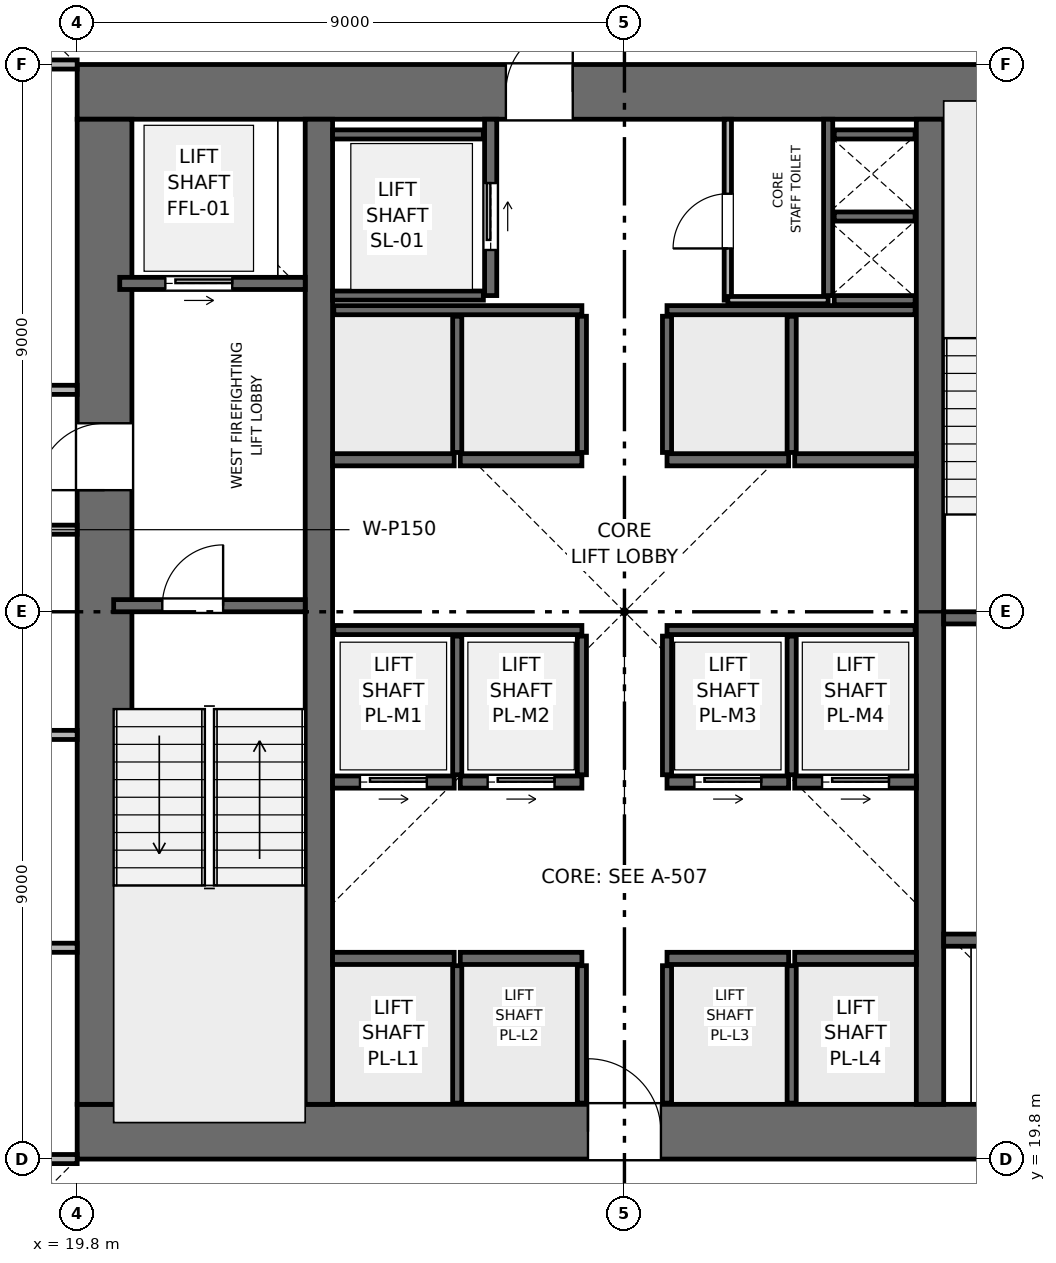
"""IFC4 building model, lengths in metres.
Left out: names, types, materials, properties, quantities, classifications, styles, units other than length and angle.
Written with IfcOpenShell. Run it as: python <this file> out.ifc"""

import sys

from ifc_helpers import new_model, si_unit, direction, frame, frame_2d, origin, place, context, subcontext, project, spatial, rectangle, extrude, element, fill, save


model = new_model("IFC4")
c1 = context("Model", 3, precision=1e-05, world=origin(), true_north=direction((0.0, 1.0)))
c2 = subcontext(c1, "Body", "Model", "MODEL_VIEW")
j1 = project(units=[si_unit("LENGTHUNIT", "METRE"), si_unit("PLANEANGLEUNIT", "RADIAN")], contexts=[c1])
p1 = place(None, origin())
s1 = spatial("IfcSite", under=j1, at=p1, CompositionType="ELEMENT")
p2 = place(p1, origin())
s2 = spatial("IfcBuilding", under=s1, at=p2, CompositionType="ELEMENT")
p3 = place(p2, frame((0.0, 0.0, 138.3)))
s3 = spatial("IfcBuildingStorey", under=s2, at=p3, CompositionType="ELEMENT", Elevation=138.3)
p4 = place(p3, frame((19.8, 20.25, 0.0), z_axis=(0.0, 0.0, 1.0), x_axis=(1.0, 0.0, 0.0)))
e1 = element("IfcWall", 1, at=p4, inside=s3, PredefinedType="SHEAR", context=c2, shape_type="SweptSolid", body=[
    extrude(rectangle(XDim=18.0, YDim=0.9, at=frame_2d((9.0, 0.0))), origin(), (0.0, 0.0, 1.0), 3.75),
])
p5 = place(p4, frame((8.4, 0.0, 0.0)))
e2 = element("IfcOpeningElement", 2, at=p5, cuts=e1, PredefinedType="OPENING", context=c2, shape_type="SweptSolid", body=[
    extrude(rectangle(XDim=1.2, YDim=2.2, at=frame_2d((0.6, 1.1))), frame((0.0, 0.46, 0.0), z_axis=(0.0, -1.0, 0.0), x_axis=(1.0, 0.0, 0.0)), (0.0, 0.0, 1.0), 0.92),
])
p6 = place(p3, frame((19.8, 37.35, 0.0), z_axis=(0.0, 0.0, 1.0), x_axis=(1.0, 0.0, 0.0)))
e3 = element("IfcWall", 3, at=p6, inside=s3, PredefinedType="SHEAR", context=c2, shape_type="SweptSolid", body=[
    extrude(rectangle(XDim=18.0, YDim=0.9, at=frame_2d((9.0, 0.0))), origin(), (0.0, 0.0, 1.0), 3.75),
])
p7 = place(p6, frame((7.05, 0.0, 0.0)))
e4 = element("IfcOpeningElement", 4, at=p7, cuts=e3, PredefinedType="OPENING", context=c2, shape_type="SweptSolid", body=[
    extrude(rectangle(XDim=1.1, YDim=2.15, at=frame_2d((0.55, 1.075))), frame((0.0, 0.46, 0.0), z_axis=(0.0, -1.0, 0.0), x_axis=(1.0, 0.0, 0.0)), (0.0, 0.0, 1.0), 0.92),
])
p8 = place(p3, frame((20.25, 20.7, 0.0), z_axis=(0.0, 0.0, 1.0), x_axis=(0.0, 1.0, 0.0)))
e5 = element("IfcWall", 5, at=p8, inside=s3, PredefinedType="SHEAR", context=c2, shape_type="SweptSolid", body=[
    extrude(rectangle(XDim=16.2, YDim=0.9, at=frame_2d((8.1, 0.0))), origin(), (0.0, 0.0, 1.0), 3.75),
])
p9 = place(p8, frame((10.1, 0.0, 0.0)))
e6 = element("IfcOpeningElement", 6, at=p9, cuts=e5, PredefinedType="OPENING", context=c2, shape_type="SweptSolid", body=[
    extrude(rectangle(XDim=1.1, YDim=2.15, at=frame_2d((0.55, 1.075))), frame((0.0, 0.46, 0.0), z_axis=(0.0, -1.0, 0.0), x_axis=(1.0, 0.0, 0.0)), (0.0, 0.0, 1.0), 0.92),
])
for number, where, z_axis, x_axis in (
    (7, (23.775, 20.7, 0.0), (0.0, 0.0, 1.0), (0.0, 1.0, 0.0)),
    (8, (33.825, 20.7, 0.0), (0.0, 0.0, 1.0), (0.0, 1.0, 0.0)),
):
    element("IfcWall", number, at=place(p3, frame(where, z_axis=z_axis, x_axis=x_axis)), inside=s3, PredefinedType="SHEAR", context=c2, shape_type="SweptSolid", body=[
        extrude(rectangle(XDim=16.2, YDim=0.45, at=frame_2d((8.1, 0.0))), origin(), (0.0, 0.0, 1.0), 3.75),
    ])
p10 = place(p3, frame((20.4, 28.9, 0.0), z_axis=(0.0, 0.0, 1.0), x_axis=(1.0, 0.0, 0.0)))
e9 = element("IfcWall", 9, at=p10, inside=s3, PredefinedType="SHEAR", context=c2, shape_type="SweptSolid", body=[
    extrude(rectangle(XDim=3.15, YDim=0.2, at=frame_2d((1.575, 0.0))), origin(), (0.0, 0.0, 1.0), 3.495),
])
p11 = place(p10, frame((0.8, 0.0, 0.0)))
e10 = element("IfcOpeningElement", 10, at=p11, cuts=e9, PredefinedType="OPENING", context=c2, shape_type="SweptSolid", body=[
    extrude(rectangle(XDim=1.0, YDim=2.1, at=frame_2d((0.5, 1.05))), frame((0.0, 0.11, 0.0), z_axis=(0.0, -1.0, 0.0), x_axis=(1.0, 0.0, 0.0)), (0.0, 0.0, 1.0), 0.22),
])
p12 = place(p3, frame((34.05, 28.7, 0.0), z_axis=(0.0, 0.0, 1.0), x_axis=(1.0, 0.0, 0.0)))
e11 = element("IfcWall", 11, at=p12, inside=s3, PredefinedType="SHEAR", context=c2, shape_type="SweptSolid", body=[
    extrude(rectangle(XDim=3.15, YDim=0.2, at=frame_2d((1.575, 0.0))), origin(), (0.0, 0.0, 1.0), 3.495),
])
p13 = place(p12, frame((0.8, 0.0, 0.0)))
e12 = element("IfcOpeningElement", 12, at=p13, cuts=e11, PredefinedType="OPENING", context=c2, shape_type="SweptSolid", body=[
    extrude(rectangle(XDim=1.0, YDim=2.1, at=frame_2d((0.5, 1.05))), frame((0.0, 0.11, 0.0), z_axis=(0.0, -1.0, 0.0), x_axis=(1.0, 0.0, 0.0)), (0.0, 0.0, 1.0), 0.22),
])
p14 = place(p3, frame((32.15, 34.0, 0.0), z_axis=(0.0, 0.0, 1.0), x_axis=(0.0, 1.0, 0.0)))
e13 = element("IfcWall", 13, at=p14, inside=s3, PredefinedType="SHEAR", context=c2, shape_type="SweptSolid", body=[
    extrude(rectangle(XDim=2.9, YDim=0.15, at=frame_2d((1.45, 0.0))), origin(), (0.0, 0.0, 1.0), 3.495),
])
for number, where, z_axis, x_axis in (
    (14, (32.25, 33.925, 0.0), (0.0, 0.0, 1.0), (1.0, 0.0, 0.0)),
    (15, (32.25, 35.3, 0.0), (0.0, 0.0, 1.0), (1.0, 0.0, 0.0)),
):
    element("IfcWall", number, at=place(p3, frame(where, z_axis=z_axis, x_axis=x_axis)), inside=s3, PredefinedType="SHEAR", context=c2, shape_type="SweptSolid", body=[
        extrude(rectangle(XDim=1.33, YDim=0.15, at=frame_2d((0.665, 0.0))), origin(), (0.0, 0.0, 1.0), 3.495),
    ])
p15 = place(p3, frame((20.5, 34.2, 0.0), z_axis=(0.0, 0.0, 1.0), x_axis=(1.0, 0.0, 0.0)))
e16 = element("IfcWall", 16, at=p15, inside=s3, PredefinedType="SHEAR", context=c2, shape_type="SweptSolid", body=[
    extrude(rectangle(XDim=3.05, YDim=0.2, at=frame_2d((1.525, 0.0))), origin(), (0.0, 0.0, 1.0), 3.495),
])
p16 = place(p15, frame((0.75, 0.0, 0.0)))
e17 = element("IfcOpeningElement", 17, at=p16, cuts=e16, PredefinedType="OPENING", context=c2, shape_type="SweptSolid", body=[
    extrude(rectangle(XDim=1.1, YDim=2.15, at=frame_2d((0.55, 1.075))), frame((0.0, 0.11, 0.0), z_axis=(0.0, -1.0, 0.0), x_axis=(1.0, 0.0, 0.0)), (0.0, 0.0, 1.0), 0.22),
])
p17 = place(p3, frame((34.05, 23.4, 0.0), z_axis=(0.0, 0.0, 1.0), x_axis=(1.0, 0.0, 0.0)))
e18 = element("IfcWall", 18, at=p17, inside=s3, PredefinedType="SHEAR", context=c2, shape_type="SweptSolid", body=[
    extrude(rectangle(XDim=3.05, YDim=0.2, at=frame_2d((1.525, 0.0))), origin(), (0.0, 0.0, 1.0), 3.495),
])
p18 = place(p17, frame((1.2, 0.0, 0.0)))
e19 = element("IfcOpeningElement", 19, at=p18, cuts=e18, PredefinedType="OPENING", context=c2, shape_type="SweptSolid", body=[
    extrude(rectangle(XDim=1.1, YDim=2.15, at=frame_2d((0.55, 1.075))), frame((0.0, 0.11, 0.0), z_axis=(0.0, -1.0, 0.0), x_axis=(1.0, 0.0, 0.0)), (0.0, 0.0, 1.0), 0.22),
])
p19 = place(p3, frame((26.6, 34.0, 0.0), z_axis=(0.0, 0.0, 1.0), x_axis=(0.0, 1.0, 0.0)))
e20 = element("IfcWall", 20, at=p19, inside=s3, PredefinedType="SHEAR", context=c2, shape_type="SweptSolid", body=[
    extrude(rectangle(XDim=2.9, YDim=0.2, at=frame_2d((1.45, 0.0))), origin(), (0.0, 0.0, 1.0), 3.495),
])
p20 = place(p19, frame((0.75, 0.0, 0.0)))
e21 = element("IfcOpeningElement", 21, at=p20, cuts=e20, PredefinedType="OPENING", context=c2, shape_type="SweptSolid", body=[
    extrude(rectangle(XDim=1.1, YDim=2.15, at=frame_2d((0.55, 1.075))), frame((0.0, 0.11, 0.0), z_axis=(0.0, -1.0, 0.0), x_axis=(1.0, 0.0, 0.0)), (0.0, 0.0, 1.0), 0.22),
])
for number, where, z_axis, x_axis in (
    (22, (24.0, 34.0, 0.0), (0.0, 0.0, 1.0), (1.0, 0.0, 0.0)),
    (23, (24.0, 36.65, 0.0), (0.0, 0.0, 1.0), (1.0, 0.0, 0.0)),
):
    element("IfcWall", number, at=place(p3, frame(where, z_axis=z_axis, x_axis=x_axis)), inside=s3, PredefinedType="SHEAR", context=c2, shape_type="SweptSolid", body=[
        extrude(rectangle(XDim=2.48, YDim=0.15, at=frame_2d((1.24, 0.0))), origin(), (0.0, 0.0, 1.0), 3.495),
    ])
for number, where, z_axis, x_axis in (
    (24, (24.0, 23.1, 0.0), (0.0, 0.0, 1.0), (1.0, 0.0, 0.0)),
    (25, (26.1, 23.1, 0.0), (0.0, 0.0, 1.0), (1.0, 0.0, 0.0)),
    (26, (29.5, 23.1, 0.0), (0.0, 0.0, 1.0), (1.0, 0.0, 0.0)),
    (27, (31.6, 23.1, 0.0), (0.0, 0.0, 1.0), (1.0, 0.0, 0.0)),
):
    element("IfcWall", number, at=place(p3, frame(where, z_axis=z_axis, x_axis=x_axis)), inside=s3, PredefinedType="SHEAR", context=c2, shape_type="SweptSolid", body=[
        extrude(rectangle(XDim=2.0, YDim=0.2, at=frame_2d((1.0, 0.0))), origin(), (0.0, 0.0, 1.0), 3.495),
    ])
p21 = place(p3, frame((24.0, 26.0, 0.0), z_axis=(0.0, 0.0, 1.0), x_axis=(1.0, 0.0, 0.0)))
e28 = element("IfcWall", 28, at=p21, inside=s3, PredefinedType="SHEAR", context=c2, shape_type="SweptSolid", body=[
    extrude(rectangle(XDim=2.0, YDim=0.2, at=frame_2d((1.0, 0.0))), origin(), (0.0, 0.0, 1.0), 3.495),
])
p22 = place(p21, frame((0.45, 0.0, 0.0)))
e29 = element("IfcOpeningElement", 29, at=p22, cuts=e28, PredefinedType="OPENING", context=c2, shape_type="SweptSolid", body=[
    extrude(rectangle(XDim=1.1, YDim=2.15, at=frame_2d((0.55, 1.075))), frame((0.0, 0.11, 0.0), z_axis=(0.0, -1.0, 0.0), x_axis=(1.0, 0.0, 0.0)), (0.0, 0.0, 1.0), 0.22),
])
p23 = place(p3, frame((26.1, 26.0, 0.0), z_axis=(0.0, 0.0, 1.0), x_axis=(1.0, 0.0, 0.0)))
e30 = element("IfcWall", 30, at=p23, inside=s3, PredefinedType="SHEAR", context=c2, shape_type="SweptSolid", body=[
    extrude(rectangle(XDim=2.0, YDim=0.2, at=frame_2d((1.0, 0.0))), origin(), (0.0, 0.0, 1.0), 3.495),
])
p24 = place(p23, frame((0.45, 0.0, 0.0)))
e31 = element("IfcOpeningElement", 31, at=p24, cuts=e30, PredefinedType="OPENING", context=c2, shape_type="SweptSolid", body=[
    extrude(rectangle(XDim=1.1, YDim=2.15, at=frame_2d((0.55, 1.075))), frame((0.0, 0.11, 0.0), z_axis=(0.0, -1.0, 0.0), x_axis=(1.0, 0.0, 0.0)), (0.0, 0.0, 1.0), 0.22),
])
p25 = place(p3, frame((29.5, 26.0, 0.0), z_axis=(0.0, 0.0, 1.0), x_axis=(1.0, 0.0, 0.0)))
e32 = element("IfcWall", 32, at=p25, inside=s3, PredefinedType="SHEAR", context=c2, shape_type="SweptSolid", body=[
    extrude(rectangle(XDim=2.0, YDim=0.2, at=frame_2d((1.0, 0.0))), origin(), (0.0, 0.0, 1.0), 3.495),
])
p26 = place(p25, frame((0.45, 0.0, 0.0)))
e33 = element("IfcOpeningElement", 33, at=p26, cuts=e32, PredefinedType="OPENING", context=c2, shape_type="SweptSolid", body=[
    extrude(rectangle(XDim=1.1, YDim=2.15, at=frame_2d((0.55, 1.075))), frame((0.0, 0.11, 0.0), z_axis=(0.0, -1.0, 0.0), x_axis=(1.0, 0.0, 0.0)), (0.0, 0.0, 1.0), 0.22),
])
p27 = place(p3, frame((31.6, 26.0, 0.0), z_axis=(0.0, 0.0, 1.0), x_axis=(1.0, 0.0, 0.0)))
e34 = element("IfcWall", 34, at=p27, inside=s3, PredefinedType="SHEAR", context=c2, shape_type="SweptSolid", body=[
    extrude(rectangle(XDim=2.0, YDim=0.2, at=frame_2d((1.0, 0.0))), origin(), (0.0, 0.0, 1.0), 3.495),
])
p28 = place(p27, frame((0.45, 0.0, 0.0)))
e35 = element("IfcOpeningElement", 35, at=p28, cuts=e34, PredefinedType="OPENING", context=c2, shape_type="SweptSolid", body=[
    extrude(rectangle(XDim=1.1, YDim=2.15, at=frame_2d((0.55, 1.075))), frame((0.0, 0.11, 0.0), z_axis=(0.0, -1.0, 0.0), x_axis=(1.0, 0.0, 0.0)), (0.0, 0.0, 1.0), 0.22),
])
for number, where, z_axis, x_axis in (
    (36, (24.0, 31.3, 0.0), (0.0, 0.0, 1.0), (1.0, 0.0, 0.0)),
    (37, (26.1, 31.3, 0.0), (0.0, 0.0, 1.0), (1.0, 0.0, 0.0)),
    (38, (29.5, 31.3, 0.0), (0.0, 0.0, 1.0), (1.0, 0.0, 0.0)),
    (39, (31.6, 31.3, 0.0), (0.0, 0.0, 1.0), (1.0, 0.0, 0.0)),
):
    element("IfcWall", number, at=place(p3, frame(where, z_axis=z_axis, x_axis=x_axis)), inside=s3, PredefinedType="SHEAR", context=c2, shape_type="SweptSolid", body=[
        extrude(rectangle(XDim=2.0, YDim=0.2, at=frame_2d((1.0, 0.0))), origin(), (0.0, 0.0, 1.0), 3.495),
    ])
p29 = place(p3, frame((32.25, 36.65, 0.0), z_axis=(0.0, 0.0, 1.0), x_axis=(1.0, 0.0, 0.0)))
e40 = element("IfcWall", 40, at=p29, inside=s3, PredefinedType="SHEAR", context=c2, shape_type="SweptSolid", body=[
    extrude(rectangle(XDim=1.33, YDim=0.15, at=frame_2d((0.665, 0.0))), origin(), (0.0, 0.0, 1.0), 3.495),
])
for number, where, z_axis, x_axis in (
    (41, (26.05, 20.72, 0.0), (0.0, 0.0, 1.0), (0.0, 1.0, 0.0)),
    (42, (28.1, 20.72, 0.0), (0.0, 0.0, 1.0), (0.0, 1.0, 0.0)),
    (43, (29.5, 20.72, 0.0), (0.0, 0.0, 1.0), (0.0, 1.0, 0.0)),
    (44, (31.55, 20.72, 0.0), (0.0, 0.0, 1.0), (0.0, 1.0, 0.0)),
):
    element("IfcWall", number, at=place(p3, frame(where, z_axis=z_axis, x_axis=x_axis)), inside=s3, PredefinedType="SHEAR", context=c2, shape_type="SweptSolid", body=[
        extrude(rectangle(XDim=2.26, YDim=0.15, at=frame_2d((1.13, 0.0))), origin(), (0.0, 0.0, 1.0), 3.495),
    ])
for number, where, z_axis, x_axis in (
    (45, (24.02, 28.5, 0.0), (0.0, 0.0, 1.0), (1.0, 0.0, 0.0)),
    (46, (29.5, 28.5, 0.0), (0.0, 0.0, 1.0), (1.0, 0.0, 0.0)),
):
    element("IfcWall", number, at=place(p3, frame(where, z_axis=z_axis, x_axis=x_axis)), inside=s3, PredefinedType="SHEAR", context=c2, shape_type="SweptSolid", body=[
        extrude(rectangle(XDim=4.08, YDim=0.15, at=frame_2d((2.04, 0.0))), origin(), (0.0, 0.0, 1.0), 3.495),
    ])
for number, where, z_axis, x_axis in (
    (47, (26.05, 26.12, 0.0), (0.0, 0.0, 1.0), (0.0, 1.0, 0.0)),
    (48, (28.1, 26.12, 0.0), (0.0, 0.0, 1.0), (0.0, 1.0, 0.0)),
    (49, (29.5, 26.12, 0.0), (0.0, 0.0, 1.0), (0.0, 1.0, 0.0)),
    (50, (31.55, 26.12, 0.0), (0.0, 0.0, 1.0), (0.0, 1.0, 0.0)),
):
    element("IfcWall", number, at=place(p3, frame(where, z_axis=z_axis, x_axis=x_axis)), inside=s3, PredefinedType="SHEAR", context=c2, shape_type="SweptSolid", body=[
        extrude(rectangle(XDim=2.28, YDim=0.15, at=frame_2d((1.14, 0.0))), origin(), (0.0, 0.0, 1.0), 3.495),
    ])
for number, where, z_axis, x_axis in (
    (51, (24.02, 33.76, 0.0), (0.0, 0.0, 1.0), (1.0, 0.0, 0.0)),
    (52, (29.5, 33.76, 0.0), (0.0, 0.0, 1.0), (1.0, 0.0, 0.0)),
):
    element("IfcWall", number, at=place(p3, frame(where, z_axis=z_axis, x_axis=x_axis)), inside=s3, PredefinedType="SHEAR", context=c2, shape_type="SweptSolid", body=[
        extrude(rectangle(XDim=4.08, YDim=0.15, at=frame_2d((2.04, 0.0))), origin(), (0.0, 0.0, 1.0), 3.495),
    ])
for number, where, z_axis, x_axis in (
    (53, (26.05, 31.42, 0.0), (0.0, 0.0, 1.0), (0.0, 1.0, 0.0)),
    (54, (28.1, 31.42, 0.0), (0.0, 0.0, 1.0), (0.0, 1.0, 0.0)),
    (55, (29.5, 31.42, 0.0), (0.0, 0.0, 1.0), (0.0, 1.0, 0.0)),
    (56, (31.55, 31.42, 0.0), (0.0, 0.0, 1.0), (0.0, 1.0, 0.0)),
):
    element("IfcWall", number, at=place(p3, frame(where, z_axis=z_axis, x_axis=x_axis)), inside=s3, PredefinedType="SHEAR", context=c2, shape_type="SweptSolid", body=[
        extrude(rectangle(XDim=2.24, YDim=0.15, at=frame_2d((1.12, 0.0))), origin(), (0.0, 0.0, 1.0), 3.495),
    ])
p30 = place(p3, frame((30.5, 33.925, 0.0), z_axis=(0.0, 0.0, 1.0), x_axis=(0.0, 1.0, 0.0)))
e57 = element("IfcWall", 57, at=p30, inside=s3, PredefinedType="PARTITIONING", context=c2, shape_type="SweptSolid", body=[
    extrude(rectangle(XDim=2.975, YDim=0.12, at=frame_2d((1.487, 0.0))), origin(), (0.0, 0.0, 1.0), 3.495),
])
p31 = place(p30, frame((0.85, 0.0, 0.0)))
e58 = element("IfcOpeningElement", 58, at=p31, cuts=e57, PredefinedType="OPENING", context=c2, shape_type="SweptSolid", body=[
    extrude(rectangle(XDim=0.9, YDim=2.1, at=frame_2d((0.45, 1.05))), frame((0.0, 0.07, 0.0), z_axis=(0.0, -1.0, 0.0), x_axis=(1.0, 0.0, 0.0)), (0.0, 0.0, 1.0), 0.14),
])
p32 = place(p3, frame((30.5, 33.925, 0.0), z_axis=(0.0, 0.0, 1.0), x_axis=(1.0, 0.0, 0.0)))
e59 = element("IfcWall", 59, at=p32, inside=s3, PredefinedType="PARTITIONING", context=c2, shape_type="SweptSolid", body=[
    extrude(rectangle(XDim=1.65, YDim=0.12, at=frame_2d((0.825, 0.0))), origin(), (0.0, 0.0, 1.0), 3.495),
])
p33 = place(p3, frame((15.4, 19.8, 0.0), z_axis=(0.0, 0.0, 1.0), x_axis=(1.0, 0.0, 0.0)))
e60 = element("IfcWall", 60, at=p33, inside=s3, PredefinedType="PARTITIONING", context=c2, shape_type="SweptSolid", body=[
    extrude(rectangle(XDim=4.4, YDim=0.15, at=frame_2d((2.2, 0.0))), origin(), (0.0, 0.0, 1.0), 3.03),
])
for number, where, z_axis, x_axis in (
    (61, (15.4, 23.275, 0.0), (0.0, 0.0, 1.0), (1.0, 0.0, 0.0)),
    (62, (15.4, 26.775, 0.0), (0.0, 0.0, 1.0), (1.0, 0.0, 0.0)),
    (63, (15.4, 30.15, 0.0), (0.0, 0.0, 1.0), (1.0, 0.0, 0.0)),
    (64, (15.4, 32.45, 0.0), (0.0, 0.0, 1.0), (1.0, 0.0, 0.0)),
):
    element("IfcWall", number, at=place(p3, frame(where, z_axis=z_axis, x_axis=x_axis)), inside=s3, PredefinedType="PARTITIONING", context=c2, shape_type="SweptSolid", body=[
        extrude(rectangle(XDim=4.4, YDim=0.15, at=frame_2d((2.2, 0.0))), origin(), (0.0, 0.0, 1.0), 3.495),
    ])
p34 = place(p3, frame((15.4, 37.8, 0.0), z_axis=(0.0, 0.0, 1.0), x_axis=(1.0, 0.0, 0.0)))
e65 = element("IfcWall", 65, at=p34, inside=s3, PredefinedType="PARTITIONING", context=c2, shape_type="SweptSolid", body=[
    extrude(rectangle(XDim=4.4, YDim=0.15, at=frame_2d((2.2, 0.0))), origin(), (0.0, 0.0, 1.0), 3.03),
])
p35 = place(p11, origin())
e66 = element("IfcDoor", 66, at=p35, inside=s3, OperationType="SINGLE_SWING_RIGHT", PredefinedType="DOOR", context=c2, shape_type="SweptSolid", body=[
    extrude(rectangle(XDim=1.0, YDim=2.1, at=frame_2d((0.5, 1.05))), frame((0.0, 0.025, 0.0), z_axis=(0.0, -1.0, 0.0), x_axis=(1.0, 0.0, 0.0)), (0.0, 0.0, 1.0), 0.05),
])
fill(e10, e66)
p36 = place(p16, origin())
e67 = element("IfcDoor", 67, at=p36, inside=s3, OperationType="SLIDING_TO_RIGHT", PredefinedType="DOOR", context=c2, shape_type="SweptSolid", body=[
    extrude(rectangle(XDim=1.1, YDim=2.15, at=frame_2d((0.55, 1.075))), frame((0.0, 0.025, 0.0), z_axis=(0.0, -1.0, 0.0), x_axis=(1.0, 0.0, 0.0)), (0.0, 0.0, 1.0), 0.05),
])
fill(e17, e67)
p37 = place(p20, origin())
e68 = element("IfcDoor", 68, at=p37, inside=s3, OperationType="SLIDING_TO_RIGHT", PredefinedType="DOOR", context=c2, shape_type="SweptSolid", body=[
    extrude(rectangle(XDim=1.1, YDim=2.15, at=frame_2d((0.55, 1.075))), frame((0.0, 0.025, 0.0), z_axis=(0.0, -1.0, 0.0), x_axis=(1.0, 0.0, 0.0)), (0.0, 0.0, 1.0), 0.05),
])
fill(e21, e68)
p38 = place(p22, origin())
e69 = element("IfcDoor", 69, at=p38, inside=s3, OperationType="SLIDING_TO_RIGHT", PredefinedType="DOOR", context=c2, shape_type="SweptSolid", body=[
    extrude(rectangle(XDim=1.1, YDim=2.15, at=frame_2d((0.55, 1.075))), frame((0.0, 0.025, 0.0), z_axis=(0.0, -1.0, 0.0), x_axis=(1.0, 0.0, 0.0)), (0.0, 0.0, 1.0), 0.05),
])
fill(e29, e69)
p39 = place(p24, origin())
e70 = element("IfcDoor", 70, at=p39, inside=s3, OperationType="SLIDING_TO_RIGHT", PredefinedType="DOOR", context=c2, shape_type="SweptSolid", body=[
    extrude(rectangle(XDim=1.1, YDim=2.15, at=frame_2d((0.55, 1.075))), frame((0.0, 0.025, 0.0), z_axis=(0.0, -1.0, 0.0), x_axis=(1.0, 0.0, 0.0)), (0.0, 0.0, 1.0), 0.05),
])
fill(e31, e70)
p40 = place(p26, origin())
e71 = element("IfcDoor", 71, at=p40, inside=s3, OperationType="SLIDING_TO_RIGHT", PredefinedType="DOOR", context=c2, shape_type="SweptSolid", body=[
    extrude(rectangle(XDim=1.1, YDim=2.15, at=frame_2d((0.55, 1.075))), frame((0.0, 0.025, 0.0), z_axis=(0.0, -1.0, 0.0), x_axis=(1.0, 0.0, 0.0)), (0.0, 0.0, 1.0), 0.05),
])
fill(e33, e71)
p41 = place(p28, origin())
e72 = element("IfcDoor", 72, at=p41, inside=s3, OperationType="SLIDING_TO_RIGHT", PredefinedType="DOOR", context=c2, shape_type="SweptSolid", body=[
    extrude(rectangle(XDim=1.1, YDim=2.15, at=frame_2d((0.55, 1.075))), frame((0.0, 0.025, 0.0), z_axis=(0.0, -1.0, 0.0), x_axis=(1.0, 0.0, 0.0)), (0.0, 0.0, 1.0), 0.05),
])
fill(e35, e72)
p42 = place(p31, origin())
e73 = element("IfcDoor", 73, at=p42, inside=s3, OperationType="SINGLE_SWING_LEFT", PredefinedType="DOOR", context=c2, shape_type="SweptSolid", body=[
    extrude(rectangle(XDim=0.9, YDim=2.1, at=frame_2d((0.45, 1.05))), frame((0.0, 0.025, 0.0), z_axis=(0.0, -1.0, 0.0), x_axis=(1.0, 0.0, 0.0)), (0.0, 0.0, 1.0), 0.05),
])
fill(e58, e73)
p43 = place(p9, origin())
e74 = element("IfcDoor", 74, at=p43, inside=s3, OperationType="SINGLE_SWING_LEFT", PredefinedType="DOOR", context=c2, shape_type="SweptSolid", body=[
    extrude(rectangle(XDim=1.1, YDim=2.15, at=frame_2d((0.55, 1.075))), frame((0.0, 0.025, 0.0), z_axis=(0.0, -1.0, 0.0), x_axis=(1.0, 0.0, 0.0)), (0.0, 0.0, 1.0), 0.05),
])
fill(e6, e74)
p44 = place(p5, origin())
e75 = element("IfcDoor", 75, at=p44, inside=s3, OperationType="SINGLE_SWING_LEFT", PredefinedType="DOOR", context=c2, shape_type="SweptSolid", body=[
    extrude(rectangle(XDim=1.2, YDim=2.2, at=frame_2d((0.6, 1.1))), frame((0.0, 0.025, 0.0), z_axis=(0.0, -1.0, 0.0), x_axis=(1.0, 0.0, 0.0)), (0.0, 0.0, 1.0), 0.05),
])
fill(e2, e75)
p45 = place(p7, origin())
e76 = element("IfcDoor", 76, at=p45, inside=s3, OperationType="SINGLE_SWING_RIGHT", PredefinedType="DOOR", context=c2, shape_type="SweptSolid", body=[
    extrude(rectangle(XDim=1.1, YDim=2.15, at=frame_2d((0.55, 1.075))), frame((0.0, 0.025, 0.0), z_axis=(0.0, -1.0, 0.0), x_axis=(1.0, 0.0, 0.0)), (0.0, 0.0, 1.0), 0.05),
])
fill(e4, e76)
save(model, sys.argv[1])
